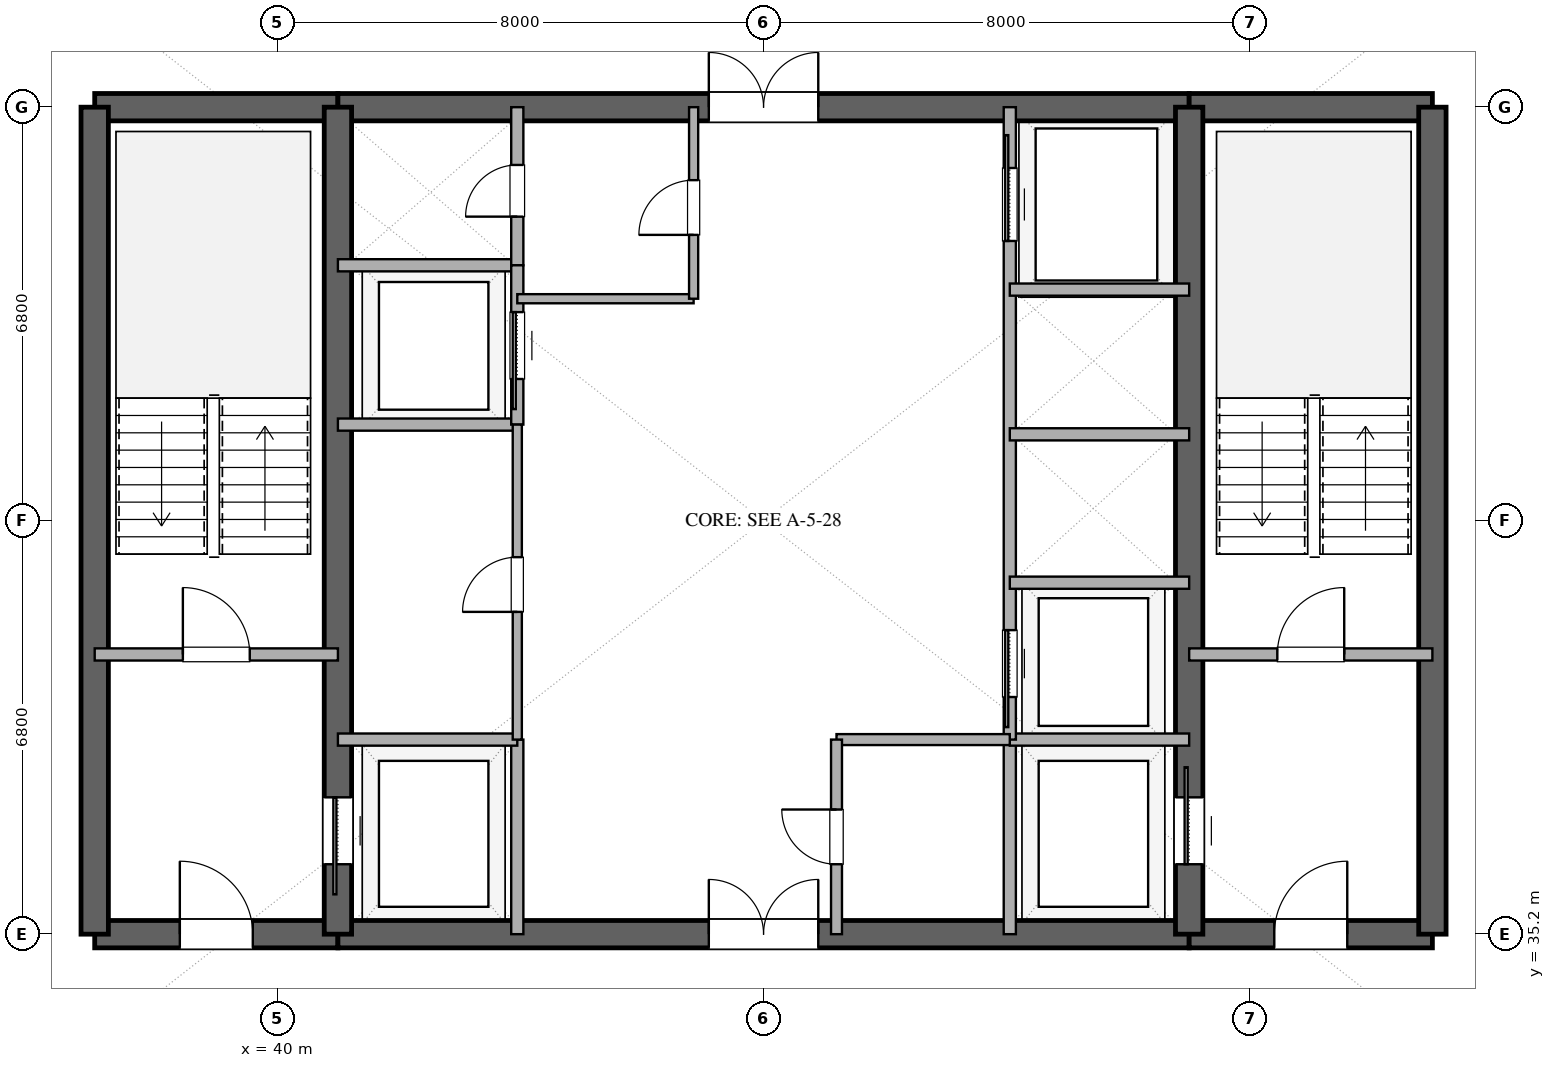
"""IFC4 building model, lengths in metres.
Left out: names, types, materials, properties, quantities, classifications, styles, units other than length and angle.
Written with IfcOpenShell. Run it as: python <this file> out.ifc"""

import sys

from ifc_helpers import new_model, si_unit, direction, frame, frame_2d, origin, place, context, subcontext, project, spatial, rectangle, extrude, element, fill, save


model = new_model("IFC4")
c1 = context("Model", 3, precision=1e-05, world=origin(), true_north=direction((0.0, 1.0)))
c2 = subcontext(c1, "Body", "Model", "MODEL_VIEW")
j1 = project(units=[si_unit("LENGTHUNIT", "METRE"), si_unit("PLANEANGLEUNIT", "RADIAN")], contexts=[c1])
p1 = place(None, origin())
s1 = spatial("IfcSite", under=j1, at=p1, CompositionType="ELEMENT")
p2 = place(p1, origin())
s2 = spatial("IfcBuilding", under=s1, at=p2, CompositionType="ELEMENT")
p3 = place(p2, frame((0.0, 0.0, 186.6)))
s3 = spatial("IfcBuildingStorey", under=s2, at=p3, CompositionType="ELEMENT", Elevation=186.6)
p4 = place(p3, frame((37.0, 35.2, 0.0), z_axis=(0.0, 0.0, 1.0), x_axis=(1.0, 0.0, 0.0)))
e1 = element("IfcWall", 1, at=p4, inside=s3, PredefinedType="SHEAR", context=c2, shape_type="SweptSolid", body=[
    extrude(rectangle(XDim=4.0, YDim=0.45, at=frame_2d((2.0, 0.0))), origin(), (0.0, 0.0, 1.0), 3.38),
])
p5 = place(p4, frame((1.4, 0.0, 0.0)))
e2 = element("IfcOpeningElement", 2, at=p5, cuts=e1, PredefinedType="OPENING", context=c2, shape_type="SweptSolid", body=[
    extrude(rectangle(XDim=1.2, YDim=2.15, at=frame_2d((0.6, 1.075))), frame((0.0, 0.235, 0.0), z_axis=(0.0, -1.0, 0.0), x_axis=(1.0, 0.0, 0.0)), (0.0, 0.0, 1.0), 0.47),
])
p6 = place(p3, frame((41.0, 35.2, 0.0), z_axis=(0.0, 0.0, 1.0), x_axis=(1.0, 0.0, 0.0)))
e3 = element("IfcWall", 3, at=p6, inside=s3, PredefinedType="SHEAR", context=c2, shape_type="SweptSolid", body=[
    extrude(rectangle(XDim=14.0, YDim=0.45, at=frame_2d((7.0, 0.0))), origin(), (0.0, 0.0, 1.0), 3.38),
])
p7 = place(p6, frame((6.1, 0.0, 0.0)))
e4 = element("IfcOpeningElement", 4, at=p7, cuts=e3, PredefinedType="OPENING", context=c2, shape_type="SweptSolid", body=[
    extrude(rectangle(XDim=1.8, YDim=2.25, at=frame_2d((0.9, 1.125))), frame((0.0, 0.235, 0.0), z_axis=(0.0, -1.0, 0.0), x_axis=(1.0, 0.0, 0.0)), (0.0, 0.0, 1.0), 0.47),
])
p8 = place(p3, frame((55.0, 35.2, 0.0), z_axis=(0.0, 0.0, 1.0), x_axis=(1.0, 0.0, 0.0)))
e5 = element("IfcWall", 5, at=p8, inside=s3, PredefinedType="SHEAR", context=c2, shape_type="SweptSolid", body=[
    extrude(rectangle(XDim=4.0, YDim=0.45, at=frame_2d((2.0, 0.0))), origin(), (0.0, 0.0, 1.0), 3.38),
])
p9 = place(p8, frame((1.4, 0.0, 0.0)))
e6 = element("IfcOpeningElement", 6, at=p9, cuts=e5, PredefinedType="OPENING", context=c2, shape_type="SweptSolid", body=[
    extrude(rectangle(XDim=1.2, YDim=2.15, at=frame_2d((0.6, 1.075))), frame((0.0, 0.235, 0.0), z_axis=(0.0, -1.0, 0.0), x_axis=(1.0, 0.0, 0.0)), (0.0, 0.0, 1.0), 0.47),
])
p10 = place(p3, frame((37.0, 48.8, 0.0), z_axis=(0.0, 0.0, 1.0), x_axis=(1.0, 0.0, 0.0)))
e7 = element("IfcWall", 7, at=p10, inside=s3, PredefinedType="SHEAR", context=c2, shape_type="SweptSolid", body=[
    extrude(rectangle(XDim=4.0, YDim=0.45, at=frame_2d((2.0, 0.0))), origin(), (0.0, 0.0, 1.0), 3.38),
])
p11 = place(p3, frame((41.0, 48.8, 0.0), z_axis=(0.0, 0.0, 1.0), x_axis=(1.0, 0.0, 0.0)))
e8 = element("IfcWall", 8, at=p11, inside=s3, PredefinedType="SHEAR", context=c2, shape_type="SweptSolid", body=[
    extrude(rectangle(XDim=14.0, YDim=0.45, at=frame_2d((7.0, 0.0))), origin(), (0.0, 0.0, 1.0), 3.38),
])
p12 = place(p11, frame((6.1, 0.0, 0.0)))
e9 = element("IfcOpeningElement", 9, at=p12, cuts=e8, PredefinedType="OPENING", context=c2, shape_type="SweptSolid", body=[
    extrude(rectangle(XDim=1.8, YDim=2.25, at=frame_2d((0.9, 1.125))), frame((0.0, 0.235, 0.0), z_axis=(0.0, -1.0, 0.0), x_axis=(1.0, 0.0, 0.0)), (0.0, 0.0, 1.0), 0.47),
])
p13 = place(p3, frame((55.0, 48.8, 0.0), z_axis=(0.0, 0.0, 1.0), x_axis=(1.0, 0.0, 0.0)))
e10 = element("IfcWall", 10, at=p13, inside=s3, PredefinedType="SHEAR", context=c2, shape_type="SweptSolid", body=[
    extrude(rectangle(XDim=4.0, YDim=0.45, at=frame_2d((2.0, 0.0))), origin(), (0.0, 0.0, 1.0), 3.38),
])
for number, where, z_axis, x_axis in (
    (11, (37.0, 35.2, 0.0), (0.0, 0.0, 1.0), (0.0, 1.0, 0.0)),
    (12, (59.0, 35.2, 0.0), (0.0, 0.0, 1.0), (0.0, 1.0, 0.0)),
):
    element("IfcWall", number, at=place(p3, frame(where, z_axis=z_axis, x_axis=x_axis)), inside=s3, PredefinedType="SHEAR", context=c2, shape_type="SweptSolid", body=[
        extrude(rectangle(XDim=13.6, YDim=0.45, at=frame_2d((6.8, 0.0))), origin(), (0.0, 0.0, 1.0), 3.38),
    ])
p14 = place(p3, frame((41.0, 35.2, 0.0), z_axis=(0.0, 0.0, 1.0), x_axis=(0.0, 1.0, 0.0)))
e13 = element("IfcWall", 13, at=p14, inside=s3, PredefinedType="SHEAR", context=c2, shape_type="SweptSolid", body=[
    extrude(rectangle(XDim=13.6, YDim=0.45, at=frame_2d((6.8, 0.0))), origin(), (0.0, 0.0, 1.0), 3.38),
])
p15 = place(p14, frame((1.15, 0.0, 0.0)))
e14 = element("IfcOpeningElement", 14, at=p15, cuts=e13, PredefinedType="OPENING", context=c2, shape_type="SweptSolid", body=[
    extrude(rectangle(XDim=1.1, YDim=2.2, at=frame_2d((0.55, 1.1))), frame((0.0, 0.235, 0.0), z_axis=(0.0, -1.0, 0.0), x_axis=(1.0, 0.0, 0.0)), (0.0, 0.0, 1.0), 0.47),
])
p16 = place(p3, frame((55.0, 35.2, 0.0), z_axis=(0.0, 0.0, 1.0), x_axis=(0.0, 1.0, 0.0)))
e15 = element("IfcWall", 15, at=p16, inside=s3, PredefinedType="SHEAR", context=c2, shape_type="SweptSolid", body=[
    extrude(rectangle(XDim=13.6, YDim=0.45, at=frame_2d((6.8, 0.0))), origin(), (0.0, 0.0, 1.0), 3.38),
])
p17 = place(p16, frame((1.15, 0.0, 0.0)))
e16 = element("IfcOpeningElement", 16, at=p17, cuts=e15, PredefinedType="OPENING", context=c2, shape_type="SweptSolid", body=[
    extrude(rectangle(XDim=1.1, YDim=2.2, at=frame_2d((0.55, 1.1))), frame((0.0, 0.235, 0.0), z_axis=(0.0, -1.0, 0.0), x_axis=(1.0, 0.0, 0.0)), (0.0, 0.0, 1.0), 0.47),
])
p18 = place(p3, frame((37.0, 39.8, 0.0), z_axis=(0.0, 0.0, 1.0), x_axis=(1.0, 0.0, 0.0)))
e17 = element("IfcWall", 17, at=p18, inside=s3, PredefinedType="SOLIDWALL", context=c2, shape_type="SweptSolid", body=[
    extrude(rectangle(XDim=4.0, YDim=0.2, at=frame_2d((2.0, 0.0))), origin(), (0.0, 0.0, 1.0), 2.74),
])
p19 = place(p18, frame((1.45, 0.0, 0.0)))
e18 = element("IfcOpeningElement", 18, at=p19, cuts=e17, PredefinedType="OPENING", context=c2, shape_type="SweptSolid", body=[
    extrude(rectangle(XDim=1.1, YDim=2.15, at=frame_2d((0.55, 1.075))), frame((0.0, 0.11, 0.0), z_axis=(0.0, -1.0, 0.0), x_axis=(1.0, 0.0, 0.0)), (0.0, 0.0, 1.0), 0.22),
])
p20 = place(p3, frame((55.0, 39.8, 0.0), z_axis=(0.0, 0.0, 1.0), x_axis=(1.0, 0.0, 0.0)))
e19 = element("IfcWall", 19, at=p20, inside=s3, PredefinedType="SOLIDWALL", context=c2, shape_type="SweptSolid", body=[
    extrude(rectangle(XDim=4.0, YDim=0.2, at=frame_2d((2.0, 0.0))), origin(), (0.0, 0.0, 1.0), 2.74),
])
p21 = place(p20, frame((1.45, 0.0, 0.0)))
e20 = element("IfcOpeningElement", 20, at=p21, cuts=e19, PredefinedType="OPENING", context=c2, shape_type="SweptSolid", body=[
    extrude(rectangle(XDim=1.1, YDim=2.15, at=frame_2d((0.55, 1.075))), frame((0.0, 0.11, 0.0), z_axis=(0.0, -1.0, 0.0), x_axis=(1.0, 0.0, 0.0)), (0.0, 0.0, 1.0), 0.22),
])
p22 = place(p3, frame((43.95, 35.2, 0.0), z_axis=(0.0, 0.0, 1.0), x_axis=(0.0, 1.0, 0.0)))
e21 = element("IfcWall", 21, at=p22, inside=s3, PredefinedType="SOLIDWALL", context=c2, shape_type="SweptSolid", body=[
    extrude(rectangle(XDim=3.2, YDim=0.2, at=frame_2d((1.6, 0.0))), origin(), (0.0, 0.0, 1.0), 2.74),
])
p23 = place(p3, frame((41.0, 38.4, 0.0), z_axis=(0.0, 0.0, 1.0), x_axis=(1.0, 0.0, 0.0)))
e22 = element("IfcWall", 22, at=p23, inside=s3, PredefinedType="SOLIDWALL", context=c2, shape_type="SweptSolid", body=[
    extrude(rectangle(XDim=2.95, YDim=0.2, at=frame_2d((1.475, 0.0))), origin(), (0.0, 0.0, 1.0), 2.74),
])
p24 = place(p3, frame((52.05, 35.2, 0.0), z_axis=(0.0, 0.0, 1.0), x_axis=(0.0, 1.0, 0.0)))
e23 = element("IfcWall", 23, at=p24, inside=s3, PredefinedType="SOLIDWALL", context=c2, shape_type="SweptSolid", body=[
    extrude(rectangle(XDim=3.2, YDim=0.2, at=frame_2d((1.6, 0.0))), origin(), (0.0, 0.0, 1.0), 2.74),
])
for number, where, z_axis, x_axis in (
    (24, (52.05, 38.4, 0.0), (0.0, 0.0, 1.0), (1.0, 0.0, 0.0)),
    (25, (41.0, 46.2, 0.0), (0.0, 0.0, 1.0), (1.0, 0.0, 0.0)),
):
    element("IfcWall", number, at=place(p3, frame(where, z_axis=z_axis, x_axis=x_axis)), inside=s3, PredefinedType="SOLIDWALL", context=c2, shape_type="SweptSolid", body=[
        extrude(rectangle(XDim=2.95, YDim=0.2, at=frame_2d((1.475, 0.0))), origin(), (0.0, 0.0, 1.0), 2.74),
    ])
p25 = place(p3, frame((43.95, 46.2, 0.0), z_axis=(0.0, 0.0, 1.0), x_axis=(0.0, 1.0, 0.0)))
e26 = element("IfcWall", 26, at=p25, inside=s3, PredefinedType="SOLIDWALL", context=c2, shape_type="SweptSolid", body=[
    extrude(rectangle(XDim=2.6, YDim=0.2, at=frame_2d((1.3, 0.0))), origin(), (0.0, 0.0, 1.0), 2.74),
])
p26 = place(p25, frame((0.8, 0.0, 0.0)))
e27 = element("IfcOpeningElement", 27, at=p26, cuts=e26, PredefinedType="OPENING", context=c2, shape_type="SweptSolid", body=[
    extrude(rectangle(XDim=0.85, YDim=2.15, at=frame_2d((0.425, 1.075))), frame((0.0, 0.11, 0.0), z_axis=(0.0, -1.0, 0.0), x_axis=(1.0, 0.0, 0.0)), (0.0, 0.0, 1.0), 0.22),
])
p27 = place(p3, frame((41.0, 43.58, 0.0), z_axis=(0.0, 0.0, 1.0), x_axis=(1.0, 0.0, 0.0)))
e28 = element("IfcWall", 28, at=p27, inside=s3, PredefinedType="SOLIDWALL", context=c2, shape_type="SweptSolid", body=[
    extrude(rectangle(XDim=2.95, YDim=0.2, at=frame_2d((1.475, 0.0))), origin(), (0.0, 0.0, 1.0), 2.74),
])
p28 = place(p3, frame((43.95, 43.58, 0.0), z_axis=(0.0, 0.0, 1.0), x_axis=(0.0, 1.0, 0.0)))
e29 = element("IfcWall", 29, at=p28, inside=s3, PredefinedType="SOLIDWALL", context=c2, shape_type="SweptSolid", body=[
    extrude(rectangle(XDim=2.62, YDim=0.2, at=frame_2d((1.31, 0.0))), origin(), (0.0, 0.0, 1.0), 2.74),
])
p29 = place(p28, frame((0.75, 0.0, 0.0)))
e30 = element("IfcOpeningElement", 30, at=p29, cuts=e29, PredefinedType="OPENING", context=c2, shape_type="SweptSolid", body=[
    extrude(rectangle(XDim=1.1, YDim=2.2, at=frame_2d((0.55, 1.1))), frame((0.0, 0.11, 0.0), z_axis=(0.0, -1.0, 0.0), x_axis=(1.0, 0.0, 0.0)), (0.0, 0.0, 1.0), 0.22),
])
p30 = place(p3, frame((43.95, 38.4, 0.0), z_axis=(0.0, 0.0, 1.0), x_axis=(0.0, 1.0, 0.0)))
e31 = element("IfcWall", 31, at=p30, inside=s3, PredefinedType="PARTITIONING", context=c2, shape_type="SweptSolid", body=[
    extrude(rectangle(XDim=5.18, YDim=0.15, at=frame_2d((2.59, 0.0))), origin(), (0.0, 0.0, 1.0), 2.74),
])
p31 = place(p30, frame((2.1, 0.0, 0.0)))
e32 = element("IfcOpeningElement", 32, at=p31, cuts=e31, PredefinedType="OPENING", context=c2, shape_type="SweptSolid", body=[
    extrude(rectangle(XDim=0.9, YDim=2.15, at=frame_2d((0.45, 1.075))), frame((0.0, 0.085, 0.0), z_axis=(0.0, -1.0, 0.0), x_axis=(1.0, 0.0, 0.0)), (0.0, 0.0, 1.0), 0.17),
])
p32 = place(p3, frame((52.05, 38.4, 0.0), z_axis=(0.0, 0.0, 1.0), x_axis=(0.0, 1.0, 0.0)))
e33 = element("IfcWall", 33, at=p32, inside=s3, PredefinedType="SOLIDWALL", context=c2, shape_type="SweptSolid", body=[
    extrude(rectangle(XDim=10.4, YDim=0.2, at=frame_2d((5.2, 0.0))), origin(), (0.0, 0.0, 1.0), 2.74),
])
p33 = place(p32, frame((0.7, 0.0, 0.0)))
e34 = element("IfcOpeningElement", 34, at=p33, cuts=e33, PredefinedType="OPENING", context=c2, shape_type="SweptSolid", body=[
    extrude(rectangle(XDim=1.1, YDim=2.2, at=frame_2d((0.55, 1.1))), frame((0.0, 0.11, 0.0), z_axis=(0.0, -1.0, 0.0), x_axis=(1.0, 0.0, 0.0)), (0.0, 0.0, 1.0), 0.22),
])
p34 = place(p32, frame((8.2, 0.0, 0.0)))
e35 = element("IfcOpeningElement", 35, at=p34, cuts=e33, PredefinedType="OPENING", context=c2, shape_type="SweptSolid", body=[
    extrude(rectangle(XDim=1.2, YDim=2.2, at=frame_2d((0.6, 1.1))), frame((0.0, 0.11, 0.0), z_axis=(0.0, -1.0, 0.0), x_axis=(1.0, 0.0, 0.0)), (0.0, 0.0, 1.0), 0.22),
])
for number, where, z_axis, x_axis in (
    (36, (52.05, 40.98, 0.0), (0.0, 0.0, 1.0), (1.0, 0.0, 0.0)),
    (37, (52.05, 43.42, 0.0), (0.0, 0.0, 1.0), (1.0, 0.0, 0.0)),
    (38, (52.05, 45.8, 0.0), (0.0, 0.0, 1.0), (1.0, 0.0, 0.0)),
):
    element("IfcWall", number, at=place(p3, frame(where, z_axis=z_axis, x_axis=x_axis)), inside=s3, PredefinedType="SOLIDWALL", context=c2, shape_type="SweptSolid", body=[
        extrude(rectangle(XDim=2.95, YDim=0.2, at=frame_2d((1.475, 0.0))), origin(), (0.0, 0.0, 1.0), 2.74),
    ])
p35 = place(p3, frame((43.95, 45.65, 0.0), z_axis=(0.0, 0.0, 1.0), x_axis=(1.0, 0.0, 0.0)))
e39 = element("IfcWall", 39, at=p35, inside=s3, PredefinedType="PARTITIONING", context=c2, shape_type="SweptSolid", body=[
    extrude(rectangle(XDim=2.9, YDim=0.15, at=frame_2d((1.45, 0.0))), origin(), (0.0, 0.0, 1.0), 2.74),
])
p36 = place(p3, frame((46.85, 45.65, 0.0), z_axis=(0.0, 0.0, 1.0), x_axis=(0.0, 1.0, 0.0)))
e40 = element("IfcWall", 40, at=p36, inside=s3, PredefinedType="PARTITIONING", context=c2, shape_type="SweptSolid", body=[
    extrude(rectangle(XDim=3.15, YDim=0.15, at=frame_2d((1.575, 0.0))), origin(), (0.0, 0.0, 1.0), 2.74),
])
p37 = place(p36, frame((1.05, 0.0, 0.0)))
e41 = element("IfcOpeningElement", 41, at=p37, cuts=e40, PredefinedType="OPENING", context=c2, shape_type="SweptSolid", body=[
    extrude(rectangle(XDim=0.9, YDim=2.15, at=frame_2d((0.45, 1.075))), frame((0.0, 0.085, 0.0), z_axis=(0.0, -1.0, 0.0), x_axis=(1.0, 0.0, 0.0)), (0.0, 0.0, 1.0), 0.17),
])
p38 = place(p3, frame((49.2, 38.4, 0.0), z_axis=(0.0, 0.0, 1.0), x_axis=(1.0, 0.0, 0.0)))
e42 = element("IfcWall", 42, at=p38, inside=s3, PredefinedType="PLUMBINGWALL", context=c2, shape_type="SweptSolid", body=[
    extrude(rectangle(XDim=2.85, YDim=0.18, at=frame_2d((1.425, 0.0))), origin(), (0.0, 0.0, 1.0), 2.74),
])
p39 = place(p3, frame((49.2, 35.2, 0.0), z_axis=(0.0, 0.0, 1.0), x_axis=(0.0, 1.0, 0.0)))
e43 = element("IfcWall", 43, at=p39, inside=s3, PredefinedType="PLUMBINGWALL", context=c2, shape_type="SweptSolid", body=[
    extrude(rectangle(XDim=3.2, YDim=0.18, at=frame_2d((1.6, 0.0))), origin(), (0.0, 0.0, 1.0), 2.74),
])
p40 = place(p39, frame((1.15, 0.0, 0.0)))
e44 = element("IfcOpeningElement", 44, at=p40, cuts=e43, PredefinedType="OPENING", context=c2, shape_type="SweptSolid", body=[
    extrude(rectangle(XDim=0.9, YDim=2.1, at=frame_2d((0.45, 1.05))), frame((0.0, 0.1, 0.0), z_axis=(0.0, -1.0, 0.0), x_axis=(1.0, 0.0, 0.0)), (0.0, 0.0, 1.0), 0.2),
])
p41 = place(p15, origin())
e45 = element("IfcDoor", 45, at=p41, inside=s3, OperationType="SLIDING_TO_LEFT", PredefinedType="DOOR", context=c2, shape_type="SweptSolid", body=[
    extrude(rectangle(XDim=1.1, YDim=2.2, at=frame_2d((0.55, 1.1))), frame((0.0, 0.025, 0.0), z_axis=(0.0, -1.0, 0.0), x_axis=(1.0, 0.0, 0.0)), (0.0, 0.0, 1.0), 0.05),
])
fill(e14, e45)
p42 = place(p17, origin())
e46 = element("IfcDoor", 46, at=p42, inside=s3, OperationType="SLIDING_TO_RIGHT", PredefinedType="DOOR", context=c2, shape_type="SweptSolid", body=[
    extrude(rectangle(XDim=1.1, YDim=2.2, at=frame_2d((0.55, 1.1))), frame((0.0, 0.025, 0.0), z_axis=(0.0, -1.0, 0.0), x_axis=(1.0, 0.0, 0.0)), (0.0, 0.0, 1.0), 0.05),
])
fill(e16, e46)
p43 = place(p5, origin())
e47 = element("IfcDoor", 47, at=p43, inside=s3, OperationType="SINGLE_SWING_LEFT", PredefinedType="DOOR", context=c2, shape_type="SweptSolid", body=[
    extrude(rectangle(XDim=1.2, YDim=2.15, at=frame_2d((0.6, 1.075))), frame((0.0, 0.025, 0.0), z_axis=(0.0, -1.0, 0.0), x_axis=(1.0, 0.0, 0.0)), (0.0, 0.0, 1.0), 0.05),
])
fill(e2, e47)
p44 = place(p9, origin())
e48 = element("IfcDoor", 48, at=p44, inside=s3, OperationType="SINGLE_SWING_RIGHT", PredefinedType="DOOR", context=c2, shape_type="SweptSolid", body=[
    extrude(rectangle(XDim=1.2, YDim=2.15, at=frame_2d((0.6, 1.075))), frame((0.0, 0.025, 0.0), z_axis=(0.0, -1.0, 0.0), x_axis=(1.0, 0.0, 0.0)), (0.0, 0.0, 1.0), 0.05),
])
fill(e6, e48)
p45 = place(p7, origin())
e49 = element("IfcDoor", 49, at=p45, inside=s3, OperationType="DOUBLE_DOOR_SINGLE_SWING", PredefinedType="DOOR", context=c2, shape_type="SweptSolid", body=[
    extrude(rectangle(XDim=1.8, YDim=2.25, at=frame_2d((0.9, 1.125))), frame((0.0, 0.025, 0.0), z_axis=(0.0, -1.0, 0.0), x_axis=(1.0, 0.0, 0.0)), (0.0, 0.0, 1.0), 0.05),
])
fill(e4, e49)
p46 = place(p12, origin())
e50 = element("IfcDoor", 50, at=p46, inside=s3, OperationType="DOUBLE_DOOR_SINGLE_SWING", PredefinedType="DOOR", context=c2, shape_type="SweptSolid", body=[
    extrude(rectangle(XDim=1.8, YDim=2.25, at=frame_2d((0.9, 1.125))), frame((0.0, 0.025, 0.0), z_axis=(0.0, -1.0, 0.0), x_axis=(1.0, 0.0, 0.0)), (0.0, 0.0, 1.0), 0.05),
])
fill(e9, e50)
p47 = place(p19, origin())
e51 = element("IfcDoor", 51, at=p47, inside=s3, OperationType="SINGLE_SWING_LEFT", PredefinedType="DOOR", context=c2, shape_type="SweptSolid", body=[
    extrude(rectangle(XDim=1.1, YDim=2.15, at=frame_2d((0.55, 1.075))), frame((0.0, 0.025, 0.0), z_axis=(0.0, -1.0, 0.0), x_axis=(1.0, 0.0, 0.0)), (0.0, 0.0, 1.0), 0.05),
])
fill(e18, e51)
p48 = place(p21, origin())
e52 = element("IfcDoor", 52, at=p48, inside=s3, OperationType="SINGLE_SWING_RIGHT", PredefinedType="DOOR", context=c2, shape_type="SweptSolid", body=[
    extrude(rectangle(XDim=1.1, YDim=2.15, at=frame_2d((0.55, 1.075))), frame((0.0, 0.025, 0.0), z_axis=(0.0, -1.0, 0.0), x_axis=(1.0, 0.0, 0.0)), (0.0, 0.0, 1.0), 0.05),
])
fill(e20, e52)
p49 = place(p26, origin())
e53 = element("IfcDoor", 53, at=p49, inside=s3, OperationType="SINGLE_SWING_LEFT", PredefinedType="DOOR", context=c2, shape_type="SweptSolid", body=[
    extrude(rectangle(XDim=0.85, YDim=2.15, at=frame_2d((0.425, 1.075))), frame((0.0, 0.025, 0.0), z_axis=(0.0, -1.0, 0.0), x_axis=(1.0, 0.0, 0.0)), (0.0, 0.0, 1.0), 0.05),
])
fill(e27, e53)
p50 = place(p29, origin())
e54 = element("IfcDoor", 54, at=p50, inside=s3, OperationType="SLIDING_TO_LEFT", PredefinedType="DOOR", context=c2, shape_type="SweptSolid", body=[
    extrude(rectangle(XDim=1.1, YDim=2.2, at=frame_2d((0.55, 1.1))), frame((0.0, 0.025, 0.0), z_axis=(0.0, -1.0, 0.0), x_axis=(1.0, 0.0, 0.0)), (0.0, 0.0, 1.0), 0.05),
])
fill(e30, e54)
p51 = place(p31, origin())
e55 = element("IfcDoor", 55, at=p51, inside=s3, OperationType="SINGLE_SWING_LEFT", PredefinedType="DOOR", context=c2, shape_type="SweptSolid", body=[
    extrude(rectangle(XDim=0.9, YDim=2.15, at=frame_2d((0.45, 1.075))), frame((0.0, 0.025, 0.0), z_axis=(0.0, -1.0, 0.0), x_axis=(1.0, 0.0, 0.0)), (0.0, 0.0, 1.0), 0.05),
])
fill(e32, e55)
p52 = place(p33, origin())
e56 = element("IfcDoor", 56, at=p52, inside=s3, OperationType="SLIDING_TO_LEFT", PredefinedType="DOOR", context=c2, shape_type="SweptSolid", body=[
    extrude(rectangle(XDim=1.1, YDim=2.2, at=frame_2d((0.55, 1.1))), frame((0.0, 0.025, 0.0), z_axis=(0.0, -1.0, 0.0), x_axis=(1.0, 0.0, 0.0)), (0.0, 0.0, 1.0), 0.05),
])
fill(e34, e56)
p53 = place(p34, origin())
e57 = element("IfcDoor", 57, at=p53, inside=s3, OperationType="SLIDING_TO_RIGHT", PredefinedType="DOOR", context=c2, shape_type="SweptSolid", body=[
    extrude(rectangle(XDim=1.2, YDim=2.2, at=frame_2d((0.6, 1.1))), frame((0.0, 0.025, 0.0), z_axis=(0.0, -1.0, 0.0), x_axis=(1.0, 0.0, 0.0)), (0.0, 0.0, 1.0), 0.05),
])
fill(e35, e57)
p54 = place(p37, origin())
e58 = element("IfcDoor", 58, at=p54, inside=s3, OperationType="SINGLE_SWING_LEFT", PredefinedType="DOOR", context=c2, shape_type="SweptSolid", body=[
    extrude(rectangle(XDim=0.9, YDim=2.15, at=frame_2d((0.45, 1.075))), frame((0.0, 0.025, 0.0), z_axis=(0.0, -1.0, 0.0), x_axis=(1.0, 0.0, 0.0)), (0.0, 0.0, 1.0), 0.05),
])
fill(e41, e58)
p55 = place(p40, origin())
e59 = element("IfcDoor", 59, at=p55, inside=s3, OperationType="SINGLE_SWING_RIGHT", PredefinedType="DOOR", context=c2, shape_type="SweptSolid", body=[
    extrude(rectangle(XDim=0.9, YDim=2.1, at=frame_2d((0.45, 1.05))), frame((0.0, 0.025, 0.0), z_axis=(0.0, -1.0, 0.0), x_axis=(1.0, 0.0, 0.0)), (0.0, 0.0, 1.0), 0.05),
])
fill(e44, e59)
save(model, sys.argv[1])
